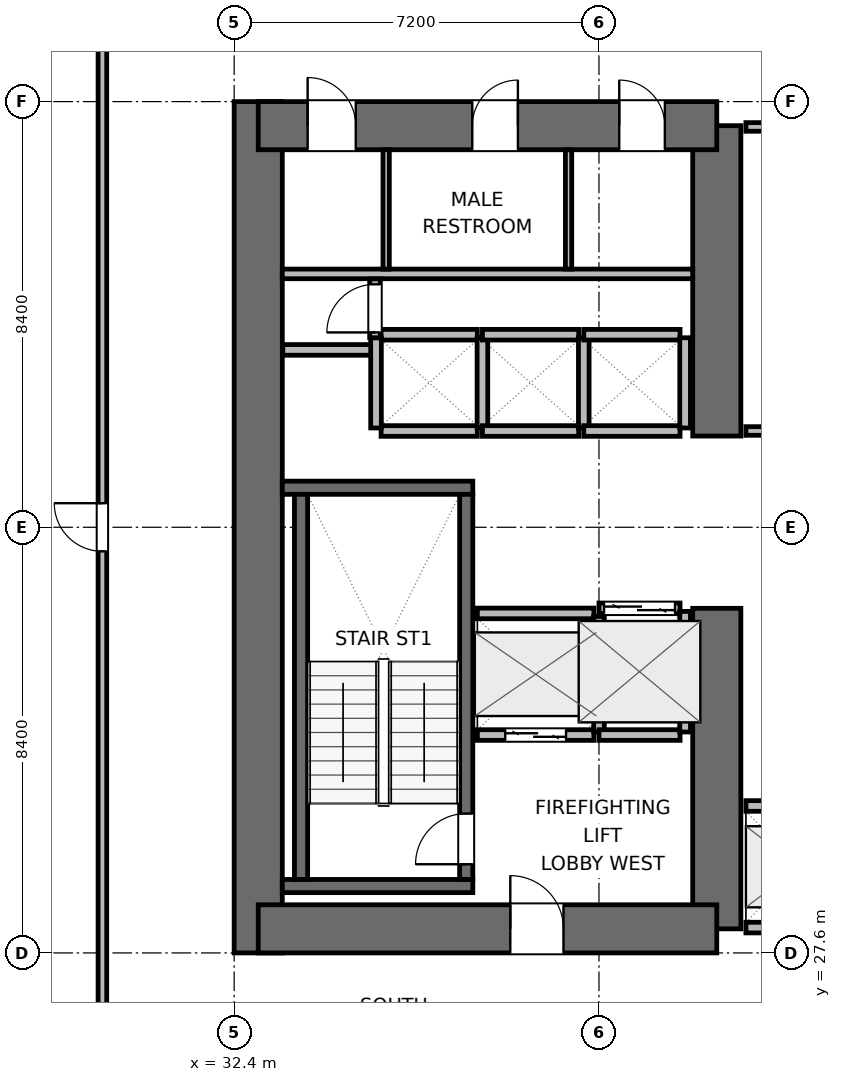
"""IFC4 building model, lengths in metres.
Left out: names, types, materials, properties, quantities, classifications, styles, units other than length and angle.
Written with IfcOpenShell. Run it as: python <this file> out.ifc"""

import sys

from ifc_helpers import new_model, si_unit, direction, frame, frame_2d, origin, place, context, subcontext, project, spatial, rectangle, extrude, element, fill, save


model = new_model("IFC4")
c1 = context("Model", 3, precision=1e-05, world=origin(), true_north=direction((0.0, 1.0)))
c2 = subcontext(c1, "Body", "Model", "MODEL_VIEW")
j1 = project(units=[si_unit("LENGTHUNIT", "METRE"), si_unit("PLANEANGLEUNIT", "RADIAN")], contexts=[c1])
p1 = place(None, origin())
s1 = spatial("IfcSite", under=j1, at=p1, CompositionType="ELEMENT")
p2 = place(p1, origin())
s2 = spatial("IfcBuilding", under=s1, at=p2, CompositionType="ELEMENT")
p3 = place(p2, frame((0.0, 0.0, 45.0)))
s3 = spatial("IfcBuildingStorey", under=s2, at=p3, CompositionType="ELEMENT", Elevation=45.0)
p4 = place(p3, frame((32.875, 27.6, 0.0), z_axis=(0.0, 0.0, 1.0), x_axis=(0.0, 1.0, 0.0)))
e1 = element("IfcWall", 1, at=p4, inside=s3, PredefinedType="SHEAR", context=c2, shape_type="SweptSolid", body=[
    extrude(rectangle(XDim=16.8, YDim=0.95, at=frame_2d((8.4, 0.0))), origin(), (0.0, 0.0, 1.0), 3.9),
])
p5 = place(p3, frame((41.925, 28.075, 0.0), z_axis=(0.0, 0.0, 1.0), x_axis=(0.0, 1.0, 0.0)))
e2 = element("IfcWall", 2, at=p5, inside=s3, PredefinedType="SHEAR", context=c2, shape_type="SweptSolid", body=[
    extrude(rectangle(XDim=6.325, YDim=0.95, at=frame_2d((3.163, 0.0))), origin(), (0.0, 0.0, 1.0), 3.9),
])
p6 = place(p3, frame((41.925, 37.8, 0.0), z_axis=(0.0, 0.0, 1.0), x_axis=(0.0, 1.0, 0.0)))
e3 = element("IfcWall", 3, at=p6, inside=s3, PredefinedType="SHEAR", context=c2, shape_type="SweptSolid", body=[
    extrude(rectangle(XDim=6.125, YDim=0.95, at=frame_2d((3.062, 0.0))), origin(), (0.0, 0.0, 1.0), 3.9),
])
p7 = place(p3, frame((32.875, 28.075, 0.0), z_axis=(0.0, 0.0, 1.0), x_axis=(1.0, 0.0, 0.0)))
e4 = element("IfcWall", 4, at=p7, inside=s3, PredefinedType="SHEAR", context=c2, shape_type="SweptSolid", body=[
    extrude(rectangle(XDim=9.05, YDim=0.95, at=frame_2d((4.525, 0.0))), origin(), (0.0, 0.0, 1.0), 3.9),
])
p8 = place(p7, frame((4.975, 0.0, 0.0)))
e5 = element("IfcOpeningElement", 5, at=p8, cuts=e4, PredefinedType="OPENING", context=c2, shape_type="SweptSolid", body=[
    extrude(rectangle(XDim=1.05, YDim=2.04, at=frame_2d((0.525, 1.02))), frame((0.0, 0.485, 0.0), z_axis=(0.0, -1.0, 0.0), x_axis=(1.0, 0.0, 0.0)), (0.0, 0.0, 1.0), 0.97),
])
p9 = place(p3, frame((32.875, 43.925, 0.0), z_axis=(0.0, 0.0, 1.0), x_axis=(1.0, 0.0, 0.0)))
e6 = element("IfcWall", 6, at=p9, inside=s3, PredefinedType="SHEAR", context=c2, shape_type="SweptSolid", body=[
    extrude(rectangle(XDim=9.05, YDim=0.95, at=frame_2d((4.525, 0.0))), origin(), (0.0, 0.0, 1.0), 3.9),
])
p10 = place(p9, frame((0.975, 0.0, 0.0)))
e7 = element("IfcOpeningElement", 7, at=p10, cuts=e6, PredefinedType="OPENING", context=c2, shape_type="SweptSolid", body=[
    extrude(rectangle(XDim=0.95, YDim=2.04, at=frame_2d((0.475, 1.02))), frame((0.0, 0.485, 0.0), z_axis=(0.0, -1.0, 0.0), x_axis=(1.0, 0.0, 0.0)), (0.0, 0.0, 1.0), 0.97),
])
p11 = place(p9, frame((4.225, 0.0, 0.0)))
e8 = element("IfcOpeningElement", 8, at=p11, cuts=e6, PredefinedType="OPENING", context=c2, shape_type="SweptSolid", body=[
    extrude(rectangle(XDim=0.9, YDim=2.02, at=frame_2d((0.45, 1.01))), frame((0.0, 0.485, 0.0), z_axis=(0.0, -1.0, 0.0), x_axis=(1.0, 0.0, 0.0)), (0.0, 0.0, 1.0), 0.97),
])
p12 = place(p9, frame((7.125, 0.0, 0.0)))
e9 = element("IfcOpeningElement", 9, at=p12, cuts=e6, PredefinedType="OPENING", context=c2, shape_type="SweptSolid", body=[
    extrude(rectangle(XDim=0.9, YDim=2.02, at=frame_2d((0.45, 1.01))), frame((0.0, 0.485, 0.0), z_axis=(0.0, -1.0, 0.0), x_axis=(1.0, 0.0, 0.0)), (0.0, 0.0, 1.0), 0.97),
])
for number, where, z_axis, x_axis in (
    (10, (33.35, 28.92, 0.0), (0.0, 0.0, 1.0), (1.0, 0.0, 0.0)),
    (11, (33.35, 36.78, 0.0), (0.0, 0.0, 1.0), (1.0, 0.0, 0.0)),
):
    element("IfcWall", number, at=place(p3, frame(where, z_axis=z_axis, x_axis=x_axis)), inside=s3, PredefinedType="SHEAR", context=c2, shape_type="SweptSolid", body=[
        extrude(rectangle(XDim=3.76, YDim=0.26, at=frame_2d((1.88, 0.0))), origin(), (0.0, 0.0, 1.0), 3.9),
    ])
p13 = place(p3, frame((33.72, 29.05, 0.0), z_axis=(0.0, 0.0, 1.0), x_axis=(0.0, 1.0, 0.0)))
e12 = element("IfcWall", 12, at=p13, inside=s3, PredefinedType="SHEAR", context=c2, shape_type="SweptSolid", body=[
    extrude(rectangle(XDim=7.6, YDim=0.26, at=frame_2d((3.8, 0.0))), origin(), (0.0, 0.0, 1.0), 3.9),
])
p14 = place(p3, frame((36.98, 29.05, 0.0), z_axis=(0.0, 0.0, 1.0), x_axis=(0.0, 1.0, 0.0)))
e13 = element("IfcWall", 13, at=p14, inside=s3, PredefinedType="SHEAR", context=c2, shape_type="SweptSolid", body=[
    extrude(rectangle(XDim=7.6, YDim=0.26, at=frame_2d((3.8, 0.0))), origin(), (0.0, 0.0, 1.0), 3.9),
])
p15 = place(p14, frame((0.3, 0.0, 0.0)))
e14 = element("IfcOpeningElement", 14, at=p15, cuts=e13, PredefinedType="OPENING", context=c2, shape_type="SweptSolid", body=[
    extrude(rectangle(XDim=1.0, YDim=2.04, at=frame_2d((0.5, 1.02))), frame((0.0, 0.14, 0.0), z_axis=(0.0, -1.0, 0.0), x_axis=(1.0, 0.0, 0.0)), (0.0, 0.0, 1.0), 0.28),
])
p16 = place(p3, frame((33.35, 41.0, 0.0), z_axis=(0.0, 0.0, 1.0), x_axis=(1.0, 0.0, 0.0)))
e15 = element("IfcWall", 15, at=p16, inside=s3, PredefinedType="PLUMBINGWALL", context=c2, shape_type="SweptSolid", body=[
    extrude(rectangle(XDim=8.1, YDim=0.19, at=frame_2d((4.05, 0.0))), origin(), (0.0, 0.0, 1.0), 3.64),
])
for number, where, z_axis, x_axis in (
    (16, (35.4, 41.095, 0.0), (0.0, 0.0, 1.0), (0.0, 1.0, 0.0)),
    (17, (39.0, 41.095, 0.0), (0.0, 0.0, 1.0), (0.0, 1.0, 0.0)),
):
    element("IfcWall", number, at=place(p3, frame(where, z_axis=z_axis, x_axis=x_axis)), inside=s3, PredefinedType="PARTITIONING", context=c2, shape_type="SweptSolid", body=[
        extrude(rectangle(XDim=2.355, YDim=0.125, at=frame_2d((1.177, 0.0))), origin(), (0.0, 0.0, 1.0), 3.64),
    ])
p17 = place(p3, frame((33.36, 39.5, 0.0), z_axis=(0.0, 0.0, 1.0), x_axis=(1.0, 0.0, 0.0)))
e18 = element("IfcWall", 18, at=p17, inside=s3, PredefinedType="PARTITIONING", context=c2, shape_type="SweptSolid", body=[
    extrude(rectangle(XDim=1.86, YDim=0.21, at=frame_2d((0.93, 0.0))), origin(), (0.0, 0.0, 1.0), 3.64),
])
p18 = place(p3, frame((37.2, 31.9, 0.0), z_axis=(0.0, 0.0, 1.0), x_axis=(1.0, 0.0, 0.0)))
e19 = element("IfcWall", 19, at=p18, inside=s3, PredefinedType="PARTITIONING", context=c2, shape_type="SweptSolid", body=[
    extrude(rectangle(XDim=2.3, YDim=0.21, at=frame_2d((1.15, 0.0))), origin(), (0.0, 0.0, 1.0), 3.64),
])
p19 = place(p18, frame((0.55, 0.0, 0.0)))
e20 = element("IfcOpeningElement", 20, at=p19, cuts=e19, PredefinedType="OPENING", context=c2, shape_type="SweptSolid", body=[
    extrude(rectangle(XDim=1.2, YDim=2.04, at=frame_2d((0.6, 1.02))), frame((0.0, 0.115, 0.0), z_axis=(0.0, -1.0, 0.0), x_axis=(1.0, 0.0, 0.0)), (0.0, 0.0, 1.0), 0.23),
])
p20 = place(p3, frame((37.2, 34.3, 0.0), z_axis=(0.0, 0.0, 1.0), x_axis=(1.0, 0.0, 0.0)))
e21 = element("IfcWall", 21, at=p20, inside=s3, PredefinedType="PARTITIONING", context=c2, shape_type="SweptSolid", body=[
    extrude(rectangle(XDim=2.3, YDim=0.21, at=frame_2d((1.15, 0.0))), origin(), (0.0, 0.0, 1.0), 3.64),
])
p21 = place(p3, frame((39.6, 31.96, 0.0), z_axis=(0.0, 0.0, 1.0), x_axis=(0.0, 1.0, 0.0)))
e22 = element("IfcWall", 22, at=p21, inside=s3, PredefinedType="PARTITIONING", context=c2, shape_type="SweptSolid", body=[
    extrude(rectangle(XDim=2.28, YDim=0.21, at=frame_2d((1.14, 0.0))), origin(), (0.0, 0.0, 1.0), 3.64),
])
p22 = place(p3, frame((39.6, 34.4, 0.0), z_axis=(0.0, 0.0, 1.0), x_axis=(1.0, 0.0, 0.0)))
e23 = element("IfcWall", 23, at=p22, inside=s3, PredefinedType="PARTITIONING", context=c2, shape_type="SweptSolid", body=[
    extrude(rectangle(XDim=1.6, YDim=0.21, at=frame_2d((0.8, 0.0))), origin(), (0.0, 0.0, 1.0), 3.64),
])
p23 = place(p22, frame((0.1, 0.0, 0.0)))
e24 = element("IfcOpeningElement", 24, at=p23, cuts=e23, PredefinedType="OPENING", context=c2, shape_type="SweptSolid", body=[
    extrude(rectangle(XDim=1.4, YDim=2.06, at=frame_2d((0.7, 1.03))), frame((0.0, 0.115, 0.0), z_axis=(0.0, -1.0, 0.0), x_axis=(1.0, 0.0, 0.0)), (0.0, 0.0, 1.0), 0.23),
])
p24 = place(p3, frame((39.6, 31.9, 0.0), z_axis=(0.0, 0.0, 1.0), x_axis=(1.0, 0.0, 0.0)))
e25 = element("IfcWall", 25, at=p24, inside=s3, PredefinedType="PARTITIONING", context=c2, shape_type="SweptSolid", body=[
    extrude(rectangle(XDim=1.6, YDim=0.21, at=frame_2d((0.8, 0.0))), origin(), (0.0, 0.0, 1.0), 3.64),
])
p25 = place(p3, frame((41.3, 31.96, 0.0), z_axis=(0.0, 0.0, 1.0), x_axis=(0.0, 1.0, 0.0)))
e26 = element("IfcWall", 26, at=p25, inside=s3, PredefinedType="PARTITIONING", context=c2, shape_type="SweptSolid", body=[
    extrude(rectangle(XDim=2.38, YDim=0.21, at=frame_2d((1.19, 0.0))), origin(), (0.0, 0.0, 1.0), 3.64),
])
p26 = place(p3, frame((42.5, 30.5, 0.0), z_axis=(0.0, 0.0, 1.0), x_axis=(1.0, 0.0, 0.0)))
e27 = element("IfcWall", 27, at=p26, inside=s3, PredefinedType="PARTITIONING", context=c2, shape_type="SweptSolid", body=[
    extrude(rectangle(XDim=2.1, YDim=0.21, at=frame_2d((1.05, 0.0))), origin(), (0.0, 0.0, 1.0), 3.64),
])
p27 = place(p26, frame((0.5, 0.0, 0.0)))
e28 = element("IfcOpeningElement", 28, at=p27, cuts=e27, PredefinedType="OPENING", context=c2, shape_type="SweptSolid", body=[
    extrude(rectangle(XDim=1.1, YDim=2.04, at=frame_2d((0.55, 1.02))), frame((0.0, 0.115, 0.0), z_axis=(0.0, -1.0, 0.0), x_axis=(1.0, 0.0, 0.0)), (0.0, 0.0, 1.0), 0.23),
])
p28 = place(p3, frame((42.5, 28.1, 0.0), z_axis=(0.0, 0.0, 1.0), x_axis=(1.0, 0.0, 0.0)))
e29 = element("IfcWall", 29, at=p28, inside=s3, PredefinedType="PARTITIONING", context=c2, shape_type="SweptSolid", body=[
    extrude(rectangle(XDim=2.1, YDim=0.21, at=frame_2d((1.05, 0.0))), origin(), (0.0, 0.0, 1.0), 2.525),
])
for number, where, z_axis, x_axis in (
    (30, (35.3, 37.9, 0.0), (0.0, 0.0, 1.0), (1.0, 0.0, 0.0)),
    (31, (35.3, 39.8, 0.0), (0.0, 0.0, 1.0), (1.0, 0.0, 0.0)),
):
    element("IfcWall", number, at=place(p3, frame(where, z_axis=z_axis, x_axis=x_axis)), inside=s3, PredefinedType="PARTITIONING", context=c2, shape_type="SweptSolid", body=[
        extrude(rectangle(XDim=1.9, YDim=0.21, at=frame_2d((0.95, 0.0))), origin(), (0.0, 0.0, 1.0), 3.64),
    ])
for number, where, z_axis, x_axis in (
    (32, (35.2, 37.96, 0.0), (0.0, 0.0, 1.0), (0.0, 1.0, 0.0)),
    (33, (37.3, 37.96, 0.0), (0.0, 0.0, 1.0), (0.0, 1.0, 0.0)),
):
    element("IfcWall", number, at=place(p3, frame(where, z_axis=z_axis, x_axis=x_axis)), inside=s3, PredefinedType="PARTITIONING", context=c2, shape_type="SweptSolid", body=[
        extrude(rectangle(XDim=1.78, YDim=0.21, at=frame_2d((0.89, 0.0))), origin(), (0.0, 0.0, 1.0), 3.64),
    ])
for number, where, z_axis, x_axis in (
    (34, (37.3, 37.9, 0.0), (0.0, 0.0, 1.0), (1.0, 0.0, 0.0)),
    (35, (37.3, 39.8, 0.0), (0.0, 0.0, 1.0), (1.0, 0.0, 0.0)),
):
    element("IfcWall", number, at=place(p3, frame(where, z_axis=z_axis, x_axis=x_axis)), inside=s3, PredefinedType="PARTITIONING", context=c2, shape_type="SweptSolid", body=[
        extrude(rectangle(XDim=1.9, YDim=0.21, at=frame_2d((0.95, 0.0))), origin(), (0.0, 0.0, 1.0), 3.64),
    ])
p29 = place(p3, frame((39.3, 37.96, 0.0), z_axis=(0.0, 0.0, 1.0), x_axis=(0.0, 1.0, 0.0)))
e36 = element("IfcWall", 36, at=p29, inside=s3, PredefinedType="PARTITIONING", context=c2, shape_type="SweptSolid", body=[
    extrude(rectangle(XDim=1.78, YDim=0.21, at=frame_2d((0.89, 0.0))), origin(), (0.0, 0.0, 1.0), 3.64),
])
for number, where, z_axis, x_axis in (
    (37, (39.3, 37.9, 0.0), (0.0, 0.0, 1.0), (1.0, 0.0, 0.0)),
    (38, (39.3, 39.8, 0.0), (0.0, 0.0, 1.0), (1.0, 0.0, 0.0)),
):
    element("IfcWall", number, at=place(p3, frame(where, z_axis=z_axis, x_axis=x_axis)), inside=s3, PredefinedType="PARTITIONING", context=c2, shape_type="SweptSolid", body=[
        extrude(rectangle(XDim=1.9, YDim=0.21, at=frame_2d((0.95, 0.0))), origin(), (0.0, 0.0, 1.0), 3.64),
    ])
p30 = place(p3, frame((41.3, 37.96, 0.0), z_axis=(0.0, 0.0, 1.0), x_axis=(0.0, 1.0, 0.0)))
e39 = element("IfcWall", 39, at=p30, inside=s3, PredefinedType="PARTITIONING", context=c2, shape_type="SweptSolid", body=[
    extrude(rectangle(XDim=1.78, YDim=0.21, at=frame_2d((0.89, 0.0))), origin(), (0.0, 0.0, 1.0), 3.64),
])
p31 = place(p3, frame((35.18, 39.74, 0.0), z_axis=(0.0, 0.0, 1.0), x_axis=(0.0, 1.0, 0.0)))
e40 = element("IfcWall", 40, at=p31, inside=s3, PredefinedType="PARTITIONING", context=c2, shape_type="SweptSolid", body=[
    extrude(rectangle(XDim=1.16, YDim=0.21, at=frame_2d((0.58, 0.0))), origin(), (0.0, 0.0, 1.0), 3.64),
])
p32 = place(p31, frame((0.105, 0.0, 0.0)))
e41 = element("IfcOpeningElement", 41, at=p32, cuts=e40, PredefinedType="OPENING", context=c2, shape_type="SweptSolid", body=[
    extrude(rectangle(XDim=0.95, YDim=2.04, at=frame_2d((0.475, 1.02))), frame((0.0, 0.115, 0.0), z_axis=(0.0, -1.0, 0.0), x_axis=(1.0, 0.0, 0.0)), (0.0, 0.0, 1.0), 0.23),
])
p33 = place(p3, frame((42.5, 37.9, 0.0), z_axis=(0.0, 0.0, 1.0), x_axis=(1.0, 0.0, 0.0)))
e42 = element("IfcWall", 42, at=p33, inside=s3, PredefinedType="PARTITIONING", context=c2, shape_type="SweptSolid", body=[
    extrude(rectangle(XDim=4.213, YDim=0.17, at=frame_2d((2.106, 0.0))), origin(), (0.0, 0.0, 1.0), 3.64),
])
p34 = place(p3, frame((42.5, 43.9, 0.0), z_axis=(0.0, 0.0, 1.0), x_axis=(1.0, 0.0, 0.0)))
e43 = element("IfcWall", 43, at=p34, inside=s3, PredefinedType="PARTITIONING", context=c2, shape_type="SweptSolid", body=[
    extrude(rectangle(XDim=4.213, YDim=0.17, at=frame_2d((2.106, 0.0))), origin(), (0.0, 0.0, 1.0), 2.525),
])
p35 = place(p3, frame((29.8, 24.977, 0.0), z_axis=(0.0, 0.0, 1.0), x_axis=(0.0, 1.0, 0.0)))
e44 = element("IfcWall", 44, at=p35, inside=s3, PredefinedType="PARTITIONING", context=c2, shape_type="SweptSolid", body=[
    extrude(rectangle(XDim=22.046, YDim=0.17, at=frame_2d((11.023, 0.0))), origin(), (0.0, 0.0, 1.0), 3.64),
])
p36 = place(p35, frame((10.548, 0.0, 0.0)))
e45 = element("IfcOpeningElement", 45, at=p36, cuts=e44, PredefinedType="OPENING", context=c2, shape_type="SweptSolid", body=[
    extrude(rectangle(XDim=0.95, YDim=2.04, at=frame_2d((0.475, 1.02))), frame((0.0, 0.095, 0.0), z_axis=(0.0, -1.0, 0.0), x_axis=(1.0, 0.0, 0.0)), (0.0, 0.0, 1.0), 0.19),
])
p37 = place(p15, origin())
e46 = element("IfcDoor", 46, at=p37, inside=s3, OperationType="SINGLE_SWING_LEFT", PredefinedType="DOOR", context=c2, shape_type="SweptSolid", body=[
    extrude(rectangle(XDim=1.0, YDim=2.04, at=frame_2d((0.5, 1.02))), frame((0.0, 0.025, 0.0), z_axis=(0.0, -1.0, 0.0), x_axis=(1.0, 0.0, 0.0)), (0.0, 0.0, 1.0), 0.05),
])
fill(e14, e46)
p38 = place(p19, origin())
e47 = element("IfcDoor", 47, at=p38, inside=s3, OperationType="DOUBLE_DOOR_SLIDING", PredefinedType="DOOR", context=c2, shape_type="SweptSolid", body=[
    extrude(rectangle(XDim=1.2, YDim=2.04, at=frame_2d((0.6, 1.02))), frame((0.0, 0.025, 0.0), z_axis=(0.0, -1.0, 0.0), x_axis=(1.0, 0.0, 0.0)), (0.0, 0.0, 1.0), 0.05),
])
fill(e20, e47)
p39 = place(p23, origin())
e48 = element("IfcDoor", 48, at=p39, inside=s3, OperationType="DOUBLE_DOOR_SLIDING", PredefinedType="DOOR", context=c2, shape_type="SweptSolid", body=[
    extrude(rectangle(XDim=1.4, YDim=2.06, at=frame_2d((0.7, 1.03))), frame((0.0, 0.025, 0.0), z_axis=(0.0, -1.0, 0.0), x_axis=(1.0, 0.0, 0.0)), (0.0, 0.0, 1.0), 0.05),
])
fill(e24, e48)
p40 = place(p8, origin())
e49 = element("IfcDoor", 49, at=p40, inside=s3, OperationType="SINGLE_SWING_LEFT", PredefinedType="DOOR", context=c2, shape_type="SweptSolid", body=[
    extrude(rectangle(XDim=1.05, YDim=2.04, at=frame_2d((0.525, 1.02))), frame((0.0, 0.025, 0.0), z_axis=(0.0, -1.0, 0.0), x_axis=(1.0, 0.0, 0.0)), (0.0, 0.0, 1.0), 0.05),
])
fill(e5, e49)
p41 = place(p10, origin())
e50 = element("IfcDoor", 50, at=p41, inside=s3, OperationType="SINGLE_SWING_LEFT", PredefinedType="DOOR", context=c2, shape_type="SweptSolid", body=[
    extrude(rectangle(XDim=0.95, YDim=2.04, at=frame_2d((0.475, 1.02))), frame((0.0, 0.025, 0.0), z_axis=(0.0, -1.0, 0.0), x_axis=(1.0, 0.0, 0.0)), (0.0, 0.0, 1.0), 0.05),
])
fill(e7, e50)
p42 = place(p11, origin())
e51 = element("IfcDoor", 51, at=p42, inside=s3, OperationType="SINGLE_SWING_RIGHT", PredefinedType="DOOR", context=c2, shape_type="SweptSolid", body=[
    extrude(rectangle(XDim=0.9, YDim=2.02, at=frame_2d((0.45, 1.01))), frame((0.0, 0.025, 0.0), z_axis=(0.0, -1.0, 0.0), x_axis=(1.0, 0.0, 0.0)), (0.0, 0.0, 1.0), 0.05),
])
fill(e8, e51)
p43 = place(p12, origin())
e52 = element("IfcDoor", 52, at=p43, inside=s3, OperationType="SINGLE_SWING_LEFT", PredefinedType="DOOR", context=c2, shape_type="SweptSolid", body=[
    extrude(rectangle(XDim=0.9, YDim=2.02, at=frame_2d((0.45, 1.01))), frame((0.0, 0.025, 0.0), z_axis=(0.0, -1.0, 0.0), x_axis=(1.0, 0.0, 0.0)), (0.0, 0.0, 1.0), 0.05),
])
fill(e9, e52)
p44 = place(p32, origin())
e53 = element("IfcDoor", 53, at=p44, inside=s3, OperationType="SINGLE_SWING_LEFT", PredefinedType="DOOR", context=c2, shape_type="SweptSolid", body=[
    extrude(rectangle(XDim=0.95, YDim=2.04, at=frame_2d((0.475, 1.02))), frame((0.0, 0.025, 0.0), z_axis=(0.0, -1.0, 0.0), x_axis=(1.0, 0.0, 0.0)), (0.0, 0.0, 1.0), 0.05),
])
fill(e41, e53)
p45 = place(p36, origin())
e54 = element("IfcDoor", 54, at=p45, inside=s3, OperationType="SINGLE_SWING_RIGHT", PredefinedType="DOOR", context=c2, shape_type="SweptSolid", body=[
    extrude(rectangle(XDim=0.95, YDim=2.04, at=frame_2d((0.475, 1.02))), frame((0.0, 0.025, 0.0), z_axis=(0.0, -1.0, 0.0), x_axis=(1.0, 0.0, 0.0)), (0.0, 0.0, 1.0), 0.05),
])
fill(e45, e54)
save(model, sys.argv[1])
